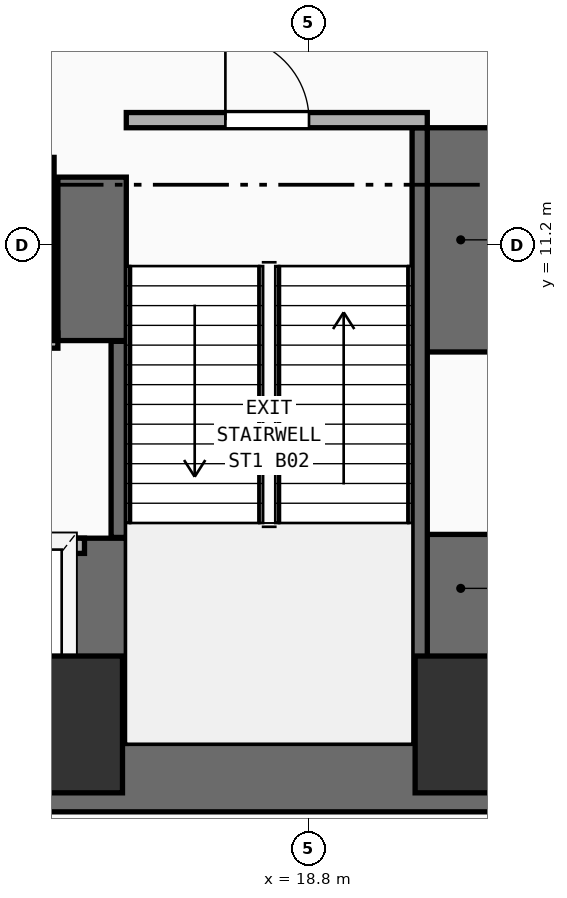
"""IFC4 building model, lengths in metres.
Left out: names, types, materials, properties, quantities, classifications, styles, units other than length and angle.
Written with IfcOpenShell. Run it as: python <this file> out.ifc"""

import sys

from ifc_helpers import new_model, si_unit, direction, frame, frame_2d, origin, origin_2d, place, context, subcontext, project, spatial, rectangle, extrude, element, fill, save


model = new_model("IFC4")
c1 = context("Model", 3, precision=1e-05, world=origin(), true_north=direction((0.0, 1.0)))
c2 = subcontext(c1, "Body", "Model", "MODEL_VIEW")
j1 = project(units=[si_unit("LENGTHUNIT", "METRE"), si_unit("PLANEANGLEUNIT", "RADIAN")], contexts=[c1])
p1 = place(None, origin())
s1 = spatial("IfcSite", under=j1, at=p1, CompositionType="ELEMENT")
p2 = place(p1, origin())
s2 = spatial("IfcBuilding", under=s1, at=p2, CompositionType="ELEMENT")
p3 = place(p2, frame((0.0, 0.0, -8.4)))
s3 = spatial("IfcBuildingStorey", under=s2, at=p3, CompositionType="ELEMENT", Elevation=-8.4)
p4 = place(p3, frame((7.0, 4.2, 0.0), z_axis=(0.0, 0.0, 1.0), x_axis=(1.0, 0.0, 0.0)))
e1 = element("IfcWall", 1, at=p4, inside=s3, PredefinedType="SHEAR", context=c2, shape_type="SweptSolid", body=[
    extrude(rectangle(XDim=14.25, YDim=0.9, at=frame_2d((7.125, 0.0))), origin(), (0.0, 0.0, 1.0), 3.86),
])
p5 = place(p3, frame((20.8, 4.65, 0.0), z_axis=(0.0, 0.0, 1.0), x_axis=(0.0, 1.0, 0.0)))
e2 = element("IfcWall", 2, at=p5, inside=s3, PredefinedType="SHEAR", context=c2, shape_type="SweptSolid", body=[
    extrude(rectangle(XDim=2.75, YDim=0.9, at=frame_2d((1.375, 0.0))), origin(), (0.0, 0.0, 1.0), 3.86),
])
p6 = place(p3, frame((20.8, 9.8, 0.0), z_axis=(0.0, 0.0, 1.0), x_axis=(0.0, 1.0, 0.0)))
e3 = element("IfcWall", 3, at=p6, inside=s3, PredefinedType="SHEAR", context=c2, shape_type="SweptSolid", body=[
    extrude(rectangle(XDim=2.95, YDim=0.9, at=frame_2d((1.475, 0.0))), origin(), (0.0, 0.0, 1.0), 3.86),
])
p7 = place(p3, frame((15.95, 4.65, 0.0), z_axis=(0.0, 0.0, 1.0), x_axis=(0.0, 1.0, 0.0)))
e4 = element("IfcWall", 4, at=p7, inside=s3, PredefinedType="SHEAR", context=c2, shape_type="SweptSolid", body=[
    extrude(rectangle(XDim=2.7, YDim=0.9, at=frame_2d((1.35, 0.0))), origin(), (0.0, 0.0, 1.0), 3.86),
])
p8 = place(p3, frame((15.95, 9.95, 0.0), z_axis=(0.0, 0.0, 1.0), x_axis=(0.0, 1.0, 0.0)))
e5 = element("IfcWall", 5, at=p8, inside=s3, PredefinedType="SHEAR", context=c2, shape_type="SweptSolid", body=[
    extrude(rectangle(XDim=2.15, YDim=0.9, at=frame_2d((1.075, 0.0))), origin(), (0.0, 0.0, 1.0), 3.86),
])
for number, where, z_axis, x_axis in (
    (6, (15.45, 4.9, 0.0), (0.0, 0.0, 1.0), (1.0, 0.0, 0.0)),
    (7, (21.1, 4.9, 0.0), (0.0, 0.0, 1.0), (1.0, 0.0, 0.0)),
):
    element("IfcColumn", number, at=place(p3, frame(where, z_axis=z_axis, x_axis=x_axis)), inside=s3, PredefinedType="COLUMN", context=c2, shape_type="SweptSolid", body=[
        extrude(rectangle(XDim=1.8, YDim=1.8, at=origin_2d()), origin(), (0.0, 0.0, 1.0), 3.86),
    ])
p9 = place(p3, frame((16.3, 7.36, 0.0), z_axis=(0.0, 0.0, 1.0), x_axis=(0.0, 1.0, 0.0)))
e8 = element("IfcWall", 8, at=p9, inside=s3, PredefinedType="SHEAR", context=c2, shape_type="SweptSolid", body=[
    extrude(rectangle(XDim=2.58, YDim=0.2, at=frame_2d((1.29, 0.0))), origin(), (0.0, 0.0, 1.0), 3.86),
])
p10 = place(p3, frame((20.26, 4.66, 0.0), z_axis=(0.0, 0.0, 1.0), x_axis=(0.0, 1.0, 0.0)))
e9 = element("IfcWall", 9, at=p10, inside=s3, PredefinedType="SHEAR", context=c2, shape_type="SweptSolid", body=[
    extrude(rectangle(XDim=8.09, YDim=0.2, at=frame_2d((4.045, 0.0))), origin(), (0.0, 0.0, 1.0), 3.86),
])
p11 = place(p3, frame((16.4, 12.85, 0.0), z_axis=(0.0, 0.0, 1.0), x_axis=(1.0, 0.0, 0.0)))
e10 = element("IfcWall", 10, at=p11, inside=s3, PredefinedType="PARTITIONING", context=c2, shape_type="SweptSolid", body=[
    extrude(rectangle(XDim=3.96, YDim=0.2, at=frame_2d((1.98, 0.0))), origin(), (0.0, 0.0, 1.0), 3.86),
])
p12 = place(p11, frame((1.304, 0.0, 0.0)))
e11 = element("IfcOpeningElement", 11, at=p12, cuts=e10, PredefinedType="OPENING", context=c2, shape_type="SweptSolid", body=[
    extrude(rectangle(XDim=1.1, YDim=2.2, at=frame_2d((0.55, 1.1))), frame((0.0, 0.11, 0.0), z_axis=(0.0, -1.0, 0.0), x_axis=(1.0, 0.0, 0.0)), (0.0, 0.0, 1.0), 0.22),
])
p13 = place(p3, frame((7.5, 7.25, 0.0), z_axis=(0.0, 0.0, 1.0), x_axis=(1.0, 0.0, 0.0)))
e12 = element("IfcWall", 12, at=p13, inside=s3, PredefinedType="PARTITIONING", context=c2, shape_type="SweptSolid", body=[
    extrude(rectangle(XDim=8.35, YDim=0.2, at=frame_2d((4.175, 0.0))), origin(), (0.0, 0.0, 1.0), 3.86),
])
p14 = place(p13, frame((0.53, 0.0, 0.0)))
e13 = element("IfcOpeningElement", 13, at=p14, cuts=e12, PredefinedType="OPENING", context=c2, shape_type="SweptSolid", body=[
    extrude(rectangle(XDim=1.1, YDim=2.2, at=frame_2d((0.55, 1.1))), frame((0.0, 0.11, 0.0), z_axis=(0.0, -1.0, 0.0), x_axis=(1.0, 0.0, 0.0)), (0.0, 0.0, 1.0), 0.22),
])
p15 = place(p13, frame((2.37, 0.0, 0.0)))
e14 = element("IfcOpeningElement", 14, at=p15, cuts=e12, PredefinedType="OPENING", context=c2, shape_type="SweptSolid", body=[
    extrude(rectangle(XDim=1.1, YDim=2.2, at=frame_2d((0.55, 1.1))), frame((0.0, 0.11, 0.0), z_axis=(0.0, -1.0, 0.0), x_axis=(1.0, 0.0, 0.0)), (0.0, 0.0, 1.0), 0.22),
])
p16 = place(p13, frame((4.33, 0.0, 0.0)))
e15 = element("IfcOpeningElement", 15, at=p16, cuts=e12, PredefinedType="OPENING", context=c2, shape_type="SweptSolid", body=[
    extrude(rectangle(XDim=1.1, YDim=2.2, at=frame_2d((0.55, 1.1))), frame((0.0, 0.11, 0.0), z_axis=(0.0, -1.0, 0.0), x_axis=(1.0, 0.0, 0.0)), (0.0, 0.0, 1.0), 0.22),
])
p17 = place(p13, frame((6.5, 0.0, 0.0)))
e16 = element("IfcOpeningElement", 16, at=p17, cuts=e12, PredefinedType="OPENING", context=c2, shape_type="SweptSolid", body=[
    extrude(rectangle(XDim=1.1, YDim=2.2, at=frame_2d((0.55, 1.1))), frame((0.0, 0.11, 0.0), z_axis=(0.0, -1.0, 0.0), x_axis=(1.0, 0.0, 0.0)), (0.0, 0.0, 1.0), 0.22),
])
p18 = place(p3, frame((7.9, 9.95, 0.0), z_axis=(0.0, 0.0, 1.0), x_axis=(1.0, 0.0, 0.0)))
e17 = element("IfcWall", 17, at=p18, inside=s3, PredefinedType="PARTITIONING", context=c2, shape_type="SweptSolid", body=[
    extrude(rectangle(XDim=7.6, YDim=0.2, at=frame_2d((3.8, 0.0))), origin(), (0.0, 0.0, 1.0), 3.86),
])
p19 = place(p3, frame((15.35, 9.95, 0.0), z_axis=(0.0, 0.0, 1.0), x_axis=(0.0, 1.0, 0.0)))
e18 = element("IfcWall", 18, at=p19, inside=s3, PredefinedType="PARTITIONING", context=c2, shape_type="SweptSolid", body=[
    extrude(rectangle(XDim=2.41, YDim=0.2, at=frame_2d((1.205, 0.0))), origin(), (0.0, 0.0, 1.0), 3.86),
])
p20 = place(p12, frame((1.1, 0.0, 0.0), z_axis=(0.0, 0.0, 1.0), x_axis=(-1.0, 0.0, 0.0)))
e19 = element("IfcDoor", 19, at=p20, inside=s3, OperationType="SINGLE_SWING_RIGHT", PredefinedType="DOOR", context=c2, shape_type="SweptSolid", body=[
    extrude(rectangle(XDim=1.1, YDim=2.2, at=frame_2d((0.55, 1.1))), frame((0.0, 0.025, 0.0), z_axis=(0.0, -1.0, 0.0), x_axis=(1.0, 0.0, 0.0)), (0.0, 0.0, 1.0), 0.05),
])
fill(e11, e19)
save(model, sys.argv[1])
